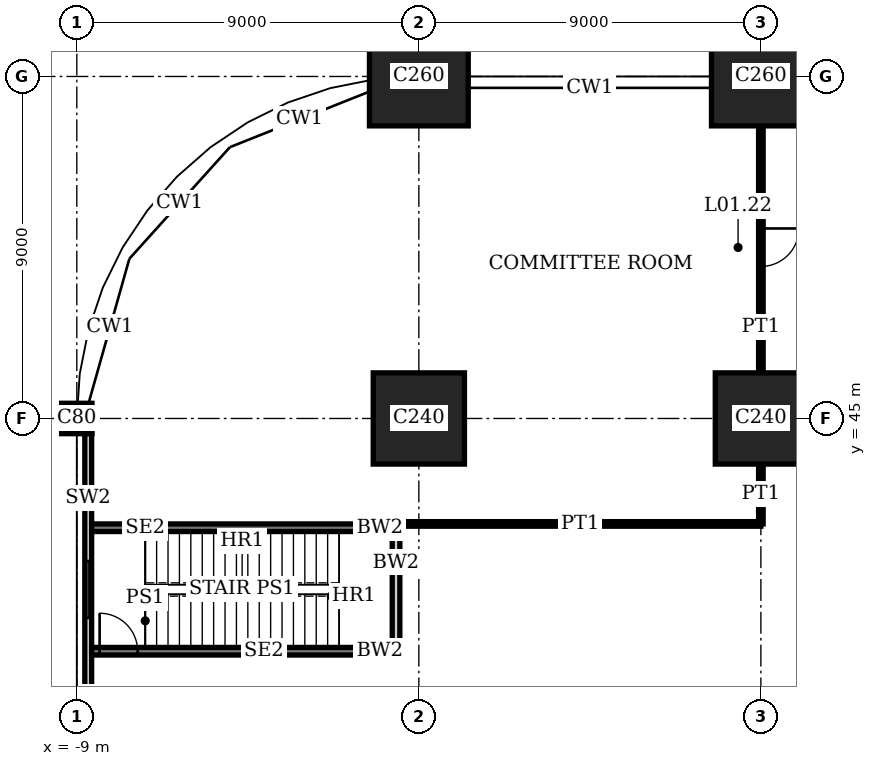
"""IFC4 building model, lengths in metres.
Left out: names, types, materials, properties, quantities, classifications, styles, units other than length and angle.
Written with IfcOpenShell. Run it as: python <this file> out.ifc"""

import sys

from ifc_helpers import new_model, si_unit, direction, frame, frame_2d, origin, origin_2d, place, context, subcontext, project, spatial, rectangle, extrude, element, fill, save


model = new_model("IFC4")
c1 = context("Model", 3, precision=1e-05, world=origin(), true_north=direction((0.0, 1.0)))
c2 = subcontext(c1, "Body", "Model", "MODEL_VIEW")
j1 = project(units=[si_unit("LENGTHUNIT", "METRE"), si_unit("PLANEANGLEUNIT", "RADIAN")], contexts=[c1])
p1 = place(None, origin())
s1 = spatial("IfcSite", under=j1, at=p1, CompositionType="ELEMENT")
p2 = place(p1, origin())
s2 = spatial("IfcBuilding", under=s1, at=p2, CompositionType="ELEMENT")
p3 = place(p2, frame((0.0, 0.0, 5.4)))
s3 = spatial("IfcBuildingStorey", under=s2, at=p3, CompositionType="ELEMENT", Elevation=5.4)
p4 = place(p3, frame((-9.0, 45.0, 0.0), z_axis=(0.0, 0.0, 1.0), x_axis=(1.0, 0.0, 0.0)))
e1 = element("IfcColumn", 1, at=p4, inside=s3, PredefinedType="COLUMN", context=c2, shape_type="SweptSolid", body=[
    extrude(rectangle(XDim=0.8, YDim=0.8, at=origin_2d()), origin(), (0.0, 0.0, 1.0), 5.4),
])
p5 = place(p3, frame((0.0, 45.0, 0.0), z_axis=(0.0, 0.0, 1.0), x_axis=(1.0, 0.0, 0.0)))
e2 = element("IfcColumn", 2, at=p5, inside=s3, PredefinedType="COLUMN", context=c2, shape_type="SweptSolid", body=[
    extrude(rectangle(XDim=2.4, YDim=2.4, at=origin_2d()), origin(), (0.0, 0.0, 1.0), 5.4),
])
p6 = place(p3, frame((0.0, 54.0, 0.0), z_axis=(0.0, 0.0, 1.0), x_axis=(1.0, 0.0, 0.0)))
e3 = element("IfcColumn", 3, at=p6, inside=s3, PredefinedType="COLUMN", context=c2, shape_type="SweptSolid", body=[
    extrude(rectangle(XDim=2.6, YDim=2.6, at=origin_2d()), origin(), (0.0, 0.0, 1.0), 5.4),
])
p7 = place(p3, frame((9.0, 45.0, 0.0), z_axis=(0.0, 0.0, 1.0), x_axis=(1.0, 0.0, 0.0)))
e4 = element("IfcColumn", 4, at=p7, inside=s3, PredefinedType="COLUMN", context=c2, shape_type="SweptSolid", body=[
    extrude(rectangle(XDim=2.4, YDim=2.4, at=origin_2d()), origin(), (0.0, 0.0, 1.0), 5.4),
])
p8 = place(p3, frame((9.0, 54.0, 0.0), z_axis=(0.0, 0.0, 1.0), x_axis=(1.0, 0.0, 0.0)))
e5 = element("IfcColumn", 5, at=p8, inside=s3, PredefinedType="COLUMN", context=c2, shape_type="SweptSolid", body=[
    extrude(rectangle(XDim=2.6, YDim=2.6, at=origin_2d()), origin(), (0.0, 0.0, 1.0), 5.4),
])
p9 = place(p3, frame((-8.7, 36.4, 0.0), z_axis=(0.0, 0.0, 1.0), x_axis=(0.0, 1.0, 0.0)))
e6 = element("IfcWall", 6, at=p9, inside=s3, PredefinedType="SOLIDWALL", context=c2, shape_type="SweptSolid", body=[
    extrude(rectangle(XDim=8.2, YDim=0.18, at=frame_2d((4.1, 0.0))), origin(), (0.0, 0.0, 1.0), 4.3),
])
p10 = place(p9, frame((3.35, 0.0, 0.3)))
e7 = element("IfcOpeningElement", 7, at=p10, cuts=e6, PredefinedType="OPENING", context=c2, shape_type="SweptSolid", body=[
    extrude(rectangle(XDim=1.5, YDim=2.4, at=frame_2d((0.75, 1.2))), frame((0.0, 0.1, 0.0), z_axis=(0.0, -1.0, 0.0), x_axis=(1.0, 0.0, 0.0)), (0.0, 0.0, 1.0), 0.2),
])
p11 = place(p3, frame((9.0, 42.225, 0.0), z_axis=(0.0, 0.0, 1.0), x_axis=(0.0, 1.0, 0.0)))
e8 = element("IfcWall", 8, at=p11, inside=s3, PredefinedType="PARTITIONING", context=c2, shape_type="SweptSolid", body=[
    extrude(rectangle(XDim=1.575, YDim=0.12, at=frame_2d((0.788, 0.0))), origin(), (0.0, 0.0, 1.0), 4.3),
])
p12 = place(p3, frame((9.0, 46.2, 0.0), z_axis=(0.0, 0.0, 1.0), x_axis=(0.0, 1.0, 0.0)))
e9 = element("IfcWall", 9, at=p12, inside=s3, PredefinedType="PARTITIONING", context=c2, shape_type="SweptSolid", body=[
    extrude(rectangle(XDim=6.5, YDim=0.12, at=frame_2d((3.25, 0.0))), origin(), (0.0, 0.0, 1.0), 4.3),
])
p13 = place(p12, frame((2.8, 0.0, 0.0)))
e10 = element("IfcOpeningElement", 10, at=p13, cuts=e9, PredefinedType="OPENING", context=c2, shape_type="SweptSolid", body=[
    extrude(rectangle(XDim=1.0, YDim=2.4, at=frame_2d((0.5, 1.2))), frame((0.0, 0.07, 0.0), z_axis=(0.0, -1.0, 0.0), x_axis=(1.0, 0.0, 0.0)), (0.0, 0.0, 1.0), 0.14),
])
p14 = place(p3, frame((-0.5, 42.225, 0.0), z_axis=(0.0, 0.0, 1.0), x_axis=(1.0, 0.0, 0.0)))
e11 = element("IfcWall", 11, at=p14, inside=s3, PredefinedType="PARTITIONING", context=c2, shape_type="SweptSolid", body=[
    extrude(rectangle(XDim=9.5, YDim=0.12, at=frame_2d((4.75, 0.0))), origin(), (0.0, 0.0, 1.0), 5.1),
])
p15 = place(p3, frame((-8.61, 38.875, 0.0), z_axis=(0.0, 0.0, 1.0), x_axis=(1.0, 0.0, 0.0)))
e12 = element("IfcWall", 12, at=p15, inside=s3, PredefinedType="SOLIDWALL", context=c2, shape_type="SweptSolid", body=[
    extrude(rectangle(XDim=7.26, YDim=0.2, at=frame_2d((3.63, 0.0))), origin(), (0.0, 0.0, 1.0), 5.4),
])
p16 = place(p15, frame((0.21, 0.0, 0.0)))
e13 = element("IfcOpeningElement", 13, at=p16, cuts=e12, PredefinedType="OPENING", context=c2, shape_type="SweptSolid", body=[
    extrude(rectangle(XDim=1.0, YDim=2.4, at=frame_2d((0.5, 1.2))), frame((0.0, 0.11, 0.0), z_axis=(0.0, -1.0, 0.0), x_axis=(1.0, 0.0, 0.0)), (0.0, 0.0, 1.0), 0.22),
])
p17 = place(p3, frame((-8.61, 42.125, 0.0), z_axis=(0.0, 0.0, 1.0), x_axis=(1.0, 0.0, 0.0)))
e14 = element("IfcWall", 14, at=p17, inside=s3, PredefinedType="SOLIDWALL", context=c2, shape_type="SweptSolid", body=[
    extrude(rectangle(XDim=7.26, YDim=0.2, at=frame_2d((3.63, 0.0))), origin(), (0.0, 0.0, 1.0), 5.4),
])
for number, where, z_axis, x_axis in (
    (15, (-1.35, 38.875, 0.0), (0.0, 0.0, 1.0), (1.0, 0.0, 0.0)),
    (16, (-1.35, 42.125, 0.0), (0.0, 0.0, 1.0), (1.0, 0.0, 0.0)),
):
    element("IfcWall", number, at=place(p3, frame(where, z_axis=z_axis, x_axis=x_axis)), inside=s3, PredefinedType="SOLIDWALL", context=c2, shape_type="SweptSolid", body=[
        extrude(rectangle(XDim=0.65, YDim=0.2, at=frame_2d((0.325, 0.0))), origin(), (0.0, 0.0, 1.0), 5.4),
    ])
p18 = place(p3, frame((-0.6, 38.775, 0.0), z_axis=(0.0, 0.0, 1.0), x_axis=(0.0, 1.0, 0.0)))
e17 = element("IfcWall", 17, at=p18, inside=s3, PredefinedType="SOLIDWALL", context=c2, shape_type="SweptSolid", body=[
    extrude(rectangle(XDim=3.45, YDim=0.2, at=frame_2d((1.725, 0.0))), origin(), (0.0, 0.0, 1.0), 4.3),
])
p19 = place(p10, origin())
e18 = element("IfcWindow", 18, at=p19, inside=s3, PartitioningType="SINGLE_PANEL", PredefinedType="WINDOW", context=c2, shape_type="SweptSolid", body=[
    extrude(rectangle(XDim=1.5, YDim=2.4, at=frame_2d((0.75, 1.2))), frame((0.0, 0.03, 0.0), z_axis=(0.0, -1.0, 0.0), x_axis=(1.0, 0.0, 0.0)), (0.0, 0.0, 1.0), 0.06),
])
fill(e7, e18)
p20 = place(p13, origin())
e19 = element("IfcDoor", 19, at=p20, inside=s3, OperationType="SINGLE_SWING_RIGHT", PredefinedType="DOOR", context=c2, shape_type="SweptSolid", body=[
    extrude(rectangle(XDim=1.0, YDim=2.4, at=frame_2d((0.5, 1.2))), frame((0.0, 0.025, 0.0), z_axis=(0.0, -1.0, 0.0), x_axis=(1.0, 0.0, 0.0)), (0.0, 0.0, 1.0), 0.05),
])
fill(e10, e19)
p21 = place(p16, origin())
e20 = element("IfcDoor", 20, at=p21, inside=s3, OperationType="SINGLE_SWING_RIGHT", PredefinedType="DOOR", context=c2, shape_type="SweptSolid", body=[
    extrude(rectangle(XDim=1.0, YDim=2.4, at=frame_2d((0.5, 1.2))), frame((0.0, 0.03, 0.0), z_axis=(0.0, -1.0, 0.0), x_axis=(1.0, 0.0, 0.0)), (0.0, 0.0, 1.0), 0.06),
])
fill(e13, e20)
save(model, sys.argv[1])
